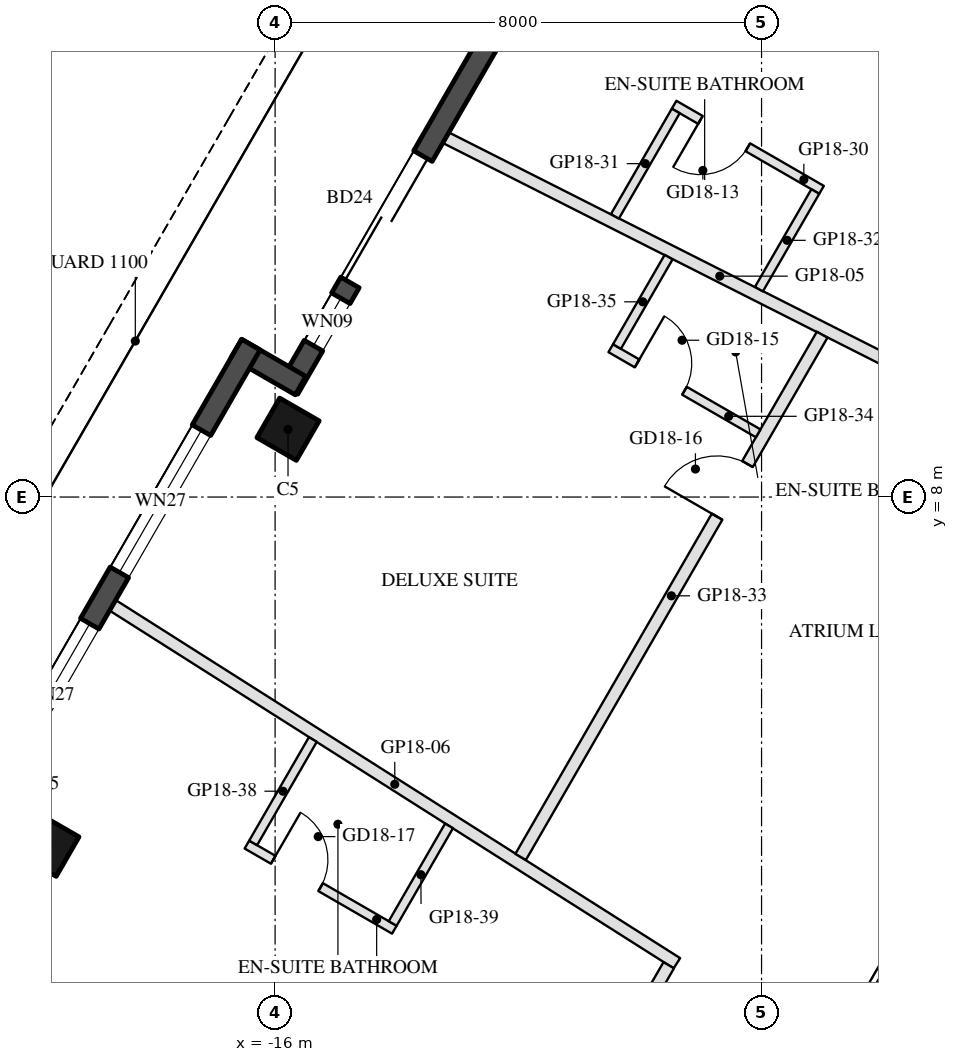
"""IFC4 building model, lengths in metres.
Left out: names, types, materials, properties, quantities, classifications, styles, units other than length and angle.
Written with IfcOpenShell. Run it as: python <this file> out.ifc"""

import sys

from ifc_helpers import new_model, si_unit, direction, frame, frame_2d, origin, origin_2d, place, context, subcontext, project, spatial, rectangle, hollow_rectangle, extrude, element, fill, save


model = new_model("IFC4")
c1 = context("Model", 3, precision=1e-05, world=origin(), true_north=direction((0.0, 1.0)))
c2 = subcontext(c1, "Body", "Model", "MODEL_VIEW")
j1 = project(units=[si_unit("LENGTHUNIT", "METRE"), si_unit("PLANEANGLEUNIT", "RADIAN")], contexts=[c1])
p1 = place(None, origin())
s1 = spatial("IfcSite", under=j1, at=p1, CompositionType="ELEMENT")
p2 = place(p1, origin())
s2 = spatial("IfcBuilding", under=s1, at=p2, CompositionType="ELEMENT")
p3 = place(p2, frame((0.0, 0.0, 198.4)))
s3 = spatial("IfcBuildingStorey", under=s2, at=p3, CompositionType="ELEMENT", Elevation=198.4)
for number, where, z_axis, x_axis in (
    (1, (-15.788, 9.115, 0.0), (0.0, 0.0, 1.0), (0.5, 0.866, 0.0)),
    (2, (-19.738, 2.273, 0.0), (0.0, 0.0, 1.0), (0.5, 0.866, 0.0)),
):
    element("IfcColumn", number, at=place(p3, frame(where, z_axis=z_axis, x_axis=x_axis)), inside=s3, PredefinedType="COLUMN", context=c2, shape_type="SweptSolid", body=[
        extrude(hollow_rectangle(XDim=0.75, YDim=0.75, WallThickness=0.035, at=origin_2d()), origin(), (0.0, 0.0, 1.0), 3.7),
    ])
p4 = place(p3, frame((-13.413, 16.029, 0.0), z_axis=(0.0, 0.0, 1.0), x_axis=(0.866005645448, -0.500034220881, 0.0)))
e3 = element("IfcWall", 3, at=p4, inside=s3, PredefinedType="SOLIDWALL", context=c2, shape_type="SweptSolid", body=[
    extrude(rectangle(XDim=1.22, YDim=0.35, at=frame_2d((0.61, 0.0))), origin(), (0.0, 0.0, 1.0), 3.55),
])
p5 = place(p3, frame((-12.409, 15.617, 0.0), z_axis=(0.0, 0.0, 1.0), x_axis=(-0.500003597184, -0.866023326939, 0.0)))
e4 = element("IfcWall", 4, at=p5, inside=s3, PredefinedType="SOLIDWALL", context=c2, shape_type="SweptSolid", body=[
    extrude(rectangle(XDim=6.74, YDim=0.35, at=frame_2d((3.37, 0.0))), origin(), (0.0, 0.0, 1.0), 3.55),
])
p6 = place(p5, frame((2.32, 0.0, 0.0)))
e5 = element("IfcOpeningElement", 5, at=p6, cuts=e4, PredefinedType="OPENING", context=c2, shape_type="SweptSolid", body=[
    extrude(rectangle(XDim=2.4, YDim=2.4, at=frame_2d((1.2, 1.2))), frame((0.0, 0.185, 0.0), z_axis=(0.0, -1.0, 0.0), x_axis=(1.0, 0.0, 0.0)), (0.0, 0.0, 1.0), 0.37),
])
p7 = place(p5, frame((5.02, 0.0, 0.3)))
e6 = element("IfcOpeningElement", 6, at=p7, cuts=e4, PredefinedType="OPENING", context=c2, shape_type="SweptSolid", body=[
    extrude(rectangle(XDim=0.9, YDim=2.65, at=frame_2d((0.45, 1.325))), frame((0.0, 0.185, 0.0), z_axis=(0.0, -1.0, 0.0), x_axis=(1.0, 0.0, 0.0)), (0.0, 0.0, 1.0), 0.37),
])
p8 = place(p3, frame((-15.581, 9.833, 0.0), z_axis=(0.0, 0.0, 1.0), x_axis=(-0.866055662726, 0.499947586314, 0.0)))
e7 = element("IfcWall", 7, at=p8, inside=s3, PredefinedType="SOLIDWALL", context=c2, shape_type="SweptSolid", body=[
    extrude(rectangle(XDim=1.22, YDim=0.35, at=frame_2d((0.61, 0.0))), origin(), (0.0, 0.0, 1.0), 3.55),
])
p9 = place(p3, frame((-16.398, 10.507, 0.0), z_axis=(0.0, 0.0, 1.0), x_axis=(-0.499999142773, -0.866025898704, 0.0)))
e8 = element("IfcWall", 8, at=p9, inside=s3, PredefinedType="SOLIDWALL", context=c2, shape_type="SweptSolid", body=[
    extrude(rectangle(XDim=9.7, YDim=0.35, at=frame_2d((4.85, 0.0))), origin(), (0.0, 0.0, 1.0), 3.55),
])
p10 = place(p9, frame((1.625, 0.0, 0.3)))
e9 = element("IfcOpeningElement", 9, at=p10, cuts=e8, PredefinedType="OPENING", context=c2, shape_type="SweptSolid", body=[
    extrude(rectangle(XDim=2.7, YDim=2.65, at=frame_2d((1.35, 1.325))), frame((0.0, 0.185, 0.0), z_axis=(0.0, -1.0, 0.0), x_axis=(1.0, 0.0, 0.0)), (0.0, 0.0, 1.0), 0.37),
])
p11 = place(p9, frame((5.3, 0.0, 0.3)))
e10 = element("IfcOpeningElement", 10, at=p11, cuts=e8, PredefinedType="OPENING", context=c2, shape_type="SweptSolid", body=[
    extrude(rectangle(XDim=2.7, YDim=2.65, at=frame_2d((1.35, 1.325))), frame((0.0, 0.185, 0.0), z_axis=(0.0, -1.0, 0.0), x_axis=(1.0, 0.0, 0.0)), (0.0, 0.0, 1.0), 0.37),
])
p12 = place(p3, frame((-13.192, 13.91, 0.0), z_axis=(0.0, 0.0, 1.0), x_axis=(0.892469554868, -0.451107629766, 0.0)))
e11 = element("IfcWall", 11, at=p12, inside=s3, PredefinedType="PARTITIONING", context=c2, shape_type="SweptSolid", body=[
    extrude(rectangle(XDim=10.096, YDim=0.2, at=frame_2d((5.048, 0.0))), origin(), (0.0, 0.0, 1.0), 3.06),
])
p13 = place(p3, frame((-18.672, 6.219, 0.0), z_axis=(0.0, 0.0, 1.0), x_axis=(0.844423533478, -0.535676111198, 0.0)))
e12 = element("IfcWall", 12, at=p13, inside=s3, PredefinedType="PARTITIONING", context=c2, shape_type="SweptSolid", body=[
    extrude(rectangle(XDim=10.99, YDim=0.2, at=frame_2d((5.495, 0.0))), origin(), (0.0, 0.0, 1.0), 2.95),
])
p14 = place(p3, frame((-7.013, 13.052, 0.0), z_axis=(0.0, 0.0, 1.0), x_axis=(-0.866034573852, 0.49998411664, 0.0)))
e13 = element("IfcWall", 13, at=p14, inside=s3, PredefinedType="PARTITIONING", context=c2, shape_type="SweptSolid", body=[
    extrude(rectangle(XDim=2.8, YDim=0.15, at=frame_2d((1.4, 0.0))), origin(), (0.0, 0.0, 1.0), 2.95),
])
p15 = place(p14, frame((1.4, 0.0, 0.0)))
e14 = element("IfcOpeningElement", 14, at=p15, cuts=e13, PredefinedType="OPENING", context=c2, shape_type="SweptSolid", body=[
    extrude(rectangle(XDim=0.9, YDim=2.1, at=frame_2d((0.45, 1.05))), frame((0.0, 0.085, 0.0), z_axis=(0.0, -1.0, 0.0), x_axis=(1.0, 0.0, 0.0)), (0.0, 0.0, 1.0), 0.17),
])
p16 = place(p3, frame((-9.411, 14.35, 0.0), z_axis=(0.0, 0.0, 1.0), x_axis=(-0.499982900776, -0.866035275801, 0.0)))
e15 = element("IfcWall", 15, at=p16, inside=s3, PredefinedType="PARTITIONING", context=c2, shape_type="SweptSolid", body=[
    extrude(rectangle(XDim=2.001, YDim=0.15, at=frame_2d((1.001, 0.0))), origin(), (0.0, 0.0, 1.0), 3.55),
])
p17 = place(p3, frame((-7.116, 13.025, 0.0), z_axis=(0.0, 0.0, 1.0), x_axis=(-0.4999770169, -0.866038672677, 0.0)))
e16 = element("IfcWall", 16, at=p17, inside=s3, PredefinedType="PARTITIONING", context=c2, shape_type="SweptSolid", body=[
    extrude(rectangle(XDim=1.854, YDim=0.15, at=frame_2d((0.927, 0.0))), origin(), (0.0, 0.0, 1.0), 3.55),
])
p18 = place(p3, frame((-11.962, 2.081, 0.0), z_axis=(0.0, 0.0, 1.0), x_axis=(0.500007290723, 0.866021194443, 0.0)))
e17 = element("IfcWall", 17, at=p18, inside=s3, PredefinedType="PARTITIONING", context=c2, shape_type="SweptSolid", body=[
    extrude(rectangle(XDim=9.917, YDim=0.2, at=frame_2d((4.958, 0.0))), origin(), (0.0, 0.0, 1.0), 2.95),
])
p19 = place(p18, frame((6.462, 0.0, 0.0)))
e18 = element("IfcOpeningElement", 18, at=p19, cuts=e17, PredefinedType="OPENING", context=c2, shape_type="SweptSolid", body=[
    extrude(rectangle(XDim=1.0, YDim=2.1, at=frame_2d((0.5, 1.05))), frame((0.0, 0.11, 0.0), z_axis=(0.0, -1.0, 0.0), x_axis=(1.0, 0.0, 0.0)), (0.0, 0.0, 1.0), 0.22),
])
p20 = place(p3, frame((-10.48, 10.448, 0.0), z_axis=(0.0, 0.0, 1.0), x_axis=(0.865996816683, -0.500049511043, 0.0)))
e19 = element("IfcWall", 19, at=p20, inside=s3, PredefinedType="PARTITIONING", context=c2, shape_type="SweptSolid", body=[
    extrude(rectangle(XDim=2.8, YDim=0.15, at=frame_2d((1.4, 0.0))), origin(), (0.0, 0.0, 1.0), 2.95),
])
p21 = place(p20, frame((0.5, 0.0, 0.0)))
e20 = element("IfcOpeningElement", 20, at=p21, cuts=e19, PredefinedType="OPENING", context=c2, shape_type="SweptSolid", body=[
    extrude(rectangle(XDim=0.9, YDim=2.1, at=frame_2d((0.45, 1.05))), frame((0.0, 0.085, 0.0), z_axis=(0.0, -1.0, 0.0), x_axis=(1.0, 0.0, 0.0)), (0.0, 0.0, 1.0), 0.17),
])
p22 = place(p3, frame((-9.529, 11.946, 0.0), z_axis=(0.0, 0.0, 1.0), x_axis=(-0.499942281444, -0.866058725044, 0.0)))
e21 = element("IfcWall", 21, at=p22, inside=s3, PredefinedType="PARTITIONING", context=c2, shape_type="SweptSolid", body=[
    extrude(rectangle(XDim=1.698, YDim=0.15, at=frame_2d((0.849, 0.0))), origin(), (0.0, 0.0, 1.0), 2.95),
])
p23 = place(p3, frame((-12.269, -4.45, 0.0), z_axis=(0.0, 0.0, 1.0), x_axis=(0.500026884667, 0.866009881359, 0.0)))
e22 = element("IfcWall", 22, at=p23, inside=s3, PredefinedType="PARTITIONING", context=c2, shape_type="SweptSolid", body=[
    extrude(rectangle(XDim=5.484, YDim=0.2, at=frame_2d((2.742, 0.0))), origin(), (0.0, 0.0, 1.0), 2.95),
])
p24 = place(p23, frame((2.242, 0.0, 0.0)))
e23 = element("IfcOpeningElement", 23, at=p24, cuts=e22, PredefinedType="OPENING", context=c2, shape_type="SweptSolid", body=[
    extrude(rectangle(XDim=1.0, YDim=2.1, at=frame_2d((0.5, 1.05))), frame((0.0, 0.11, 0.0), z_axis=(0.0, -1.0, 0.0), x_axis=(1.0, 0.0, 0.0)), (0.0, 0.0, 1.0), 0.22),
])
p25 = place(p3, frame((-16.464, 2.284, 0.0), z_axis=(0.0, 0.0, 1.0), x_axis=(0.866018616679, -0.500011755427, 0.0)))
e24 = element("IfcWall", 24, at=p25, inside=s3, PredefinedType="PARTITIONING", context=c2, shape_type="SweptSolid", body=[
    extrude(rectangle(XDim=2.8, YDim=0.15, at=frame_2d((1.4, 0.0))), origin(), (0.0, 0.0, 1.0), 3.55),
])
p26 = place(p25, frame((0.5, 0.0, 0.0)))
e25 = element("IfcOpeningElement", 25, at=p26, cuts=e24, PredefinedType="OPENING", context=c2, shape_type="SweptSolid", body=[
    extrude(rectangle(XDim=0.9, YDim=2.1, at=frame_2d((0.45, 1.05))), frame((0.0, 0.085, 0.0), z_axis=(0.0, -1.0, 0.0), x_axis=(1.0, 0.0, 0.0)), (0.0, 0.0, 1.0), 0.17),
])
p27 = place(p3, frame((-15.379, 4.012, 0.0), z_axis=(0.0, 0.0, 1.0), x_axis=(-0.500016598995, -0.866015820138, 0.0)))
e26 = element("IfcWall", 26, at=p27, inside=s3, PredefinedType="PARTITIONING", context=c2, shape_type="SweptSolid", body=[
    extrude(rectangle(XDim=1.964, YDim=0.15, at=frame_2d((0.982, 0.0))), origin(), (0.0, 0.0, 1.0), 3.55),
])
p28 = place(p3, frame((-13.14, 2.591, 0.0), z_axis=(0.0, 0.0, 1.0), x_axis=(-0.499950530793, -0.86605396296, 0.0)))
e27 = element("IfcWall", 27, at=p28, inside=s3, PredefinedType="PARTITIONING", context=c2, shape_type="SweptSolid", body=[
    extrude(rectangle(XDim=1.853, YDim=0.15, at=frame_2d((0.927, 0.0))), origin(), (0.0, 0.0, 1.0), 3.55),
])
p29 = place(p6, frame((2.4, 0.0, 0.0), z_axis=(0.0, 0.0, 1.0), x_axis=(-1.0, 0.0, 0.0)))
e28 = element("IfcDoor", 28, at=p29, inside=s3, OperationType="SLIDING_TO_LEFT", PredefinedType="DOOR", context=c2, shape_type="SweptSolid", body=[
    extrude(rectangle(XDim=2.4, YDim=2.4, at=frame_2d((1.2, 1.2))), frame((0.0, 0.025, 0.0), z_axis=(0.0, -1.0, 0.0), x_axis=(1.0, 0.0, 0.0)), (0.0, 0.0, 1.0), 0.05),
])
fill(e5, e28)
p30 = place(p7, origin())
e29 = element("IfcWindow", 29, at=p30, inside=s3, PartitioningType="SINGLE_PANEL", PredefinedType="WINDOW", context=c2, shape_type="SweptSolid", body=[
    extrude(rectangle(XDim=0.9, YDim=2.65, at=frame_2d((0.45, 1.325))), frame((0.0, 0.03, 0.0), z_axis=(0.0, -1.0, 0.0), x_axis=(1.0, 0.0, 0.0)), (0.0, 0.0, 1.0), 0.06),
])
fill(e6, e29)
p31 = place(p10, origin())
e30 = element("IfcWindow", 30, at=p31, inside=s3, PartitioningType="SINGLE_PANEL", PredefinedType="WINDOW", context=c2, shape_type="SweptSolid", body=[
    extrude(rectangle(XDim=2.7, YDim=2.65, at=frame_2d((1.35, 1.325))), frame((0.0, 0.03, 0.0), z_axis=(0.0, -1.0, 0.0), x_axis=(1.0, 0.0, 0.0)), (0.0, 0.0, 1.0), 0.06),
])
fill(e9, e30)
p32 = place(p11, origin())
e31 = element("IfcWindow", 31, at=p32, inside=s3, PartitioningType="SINGLE_PANEL", PredefinedType="WINDOW", context=c2, shape_type="SweptSolid", body=[
    extrude(rectangle(XDim=2.7, YDim=2.65, at=frame_2d((1.35, 1.325))), frame((0.0, 0.03, 0.0), z_axis=(0.0, -1.0, 0.0), x_axis=(1.0, 0.0, 0.0)), (0.0, 0.0, 1.0), 0.06),
])
fill(e10, e31)
p33 = place(p15, origin())
e32 = element("IfcDoor", 32, at=p33, inside=s3, OperationType="SINGLE_SWING_RIGHT", PredefinedType="DOOR", context=c2, shape_type="SweptSolid", body=[
    extrude(rectangle(XDim=0.9, YDim=2.1, at=frame_2d((0.45, 1.05))), frame((0.0, 0.025, 0.0), z_axis=(0.0, -1.0, 0.0), x_axis=(1.0, 0.0, 0.0)), (0.0, 0.0, 1.0), 0.05),
])
fill(e14, e32)
p34 = place(p21, origin())
e33 = element("IfcDoor", 33, at=p34, inside=s3, OperationType="SINGLE_SWING_LEFT", PredefinedType="DOOR", context=c2, shape_type="SweptSolid", body=[
    extrude(rectangle(XDim=0.9, YDim=2.1, at=frame_2d((0.45, 1.05))), frame((0.0, 0.025, 0.0), z_axis=(0.0, -1.0, 0.0), x_axis=(1.0, 0.0, 0.0)), (0.0, 0.0, 1.0), 0.05),
])
fill(e20, e33)
p35 = place(p19, origin())
e34 = element("IfcDoor", 34, at=p35, inside=s3, OperationType="SINGLE_SWING_LEFT", PredefinedType="DOOR", context=c2, shape_type="SweptSolid", body=[
    extrude(rectangle(XDim=1.0, YDim=2.1, at=frame_2d((0.5, 1.05))), frame((0.0, 0.025, 0.0), z_axis=(0.0, -1.0, 0.0), x_axis=(1.0, 0.0, 0.0)), (0.0, 0.0, 1.0), 0.05),
])
fill(e18, e34)
p36 = place(p26, origin())
e35 = element("IfcDoor", 35, at=p36, inside=s3, OperationType="SINGLE_SWING_LEFT", PredefinedType="DOOR", context=c2, shape_type="SweptSolid", body=[
    extrude(rectangle(XDim=0.9, YDim=2.1, at=frame_2d((0.45, 1.05))), frame((0.0, 0.025, 0.0), z_axis=(0.0, -1.0, 0.0), x_axis=(1.0, 0.0, 0.0)), (0.0, 0.0, 1.0), 0.05),
])
fill(e25, e35)
save(model, sys.argv[1])
